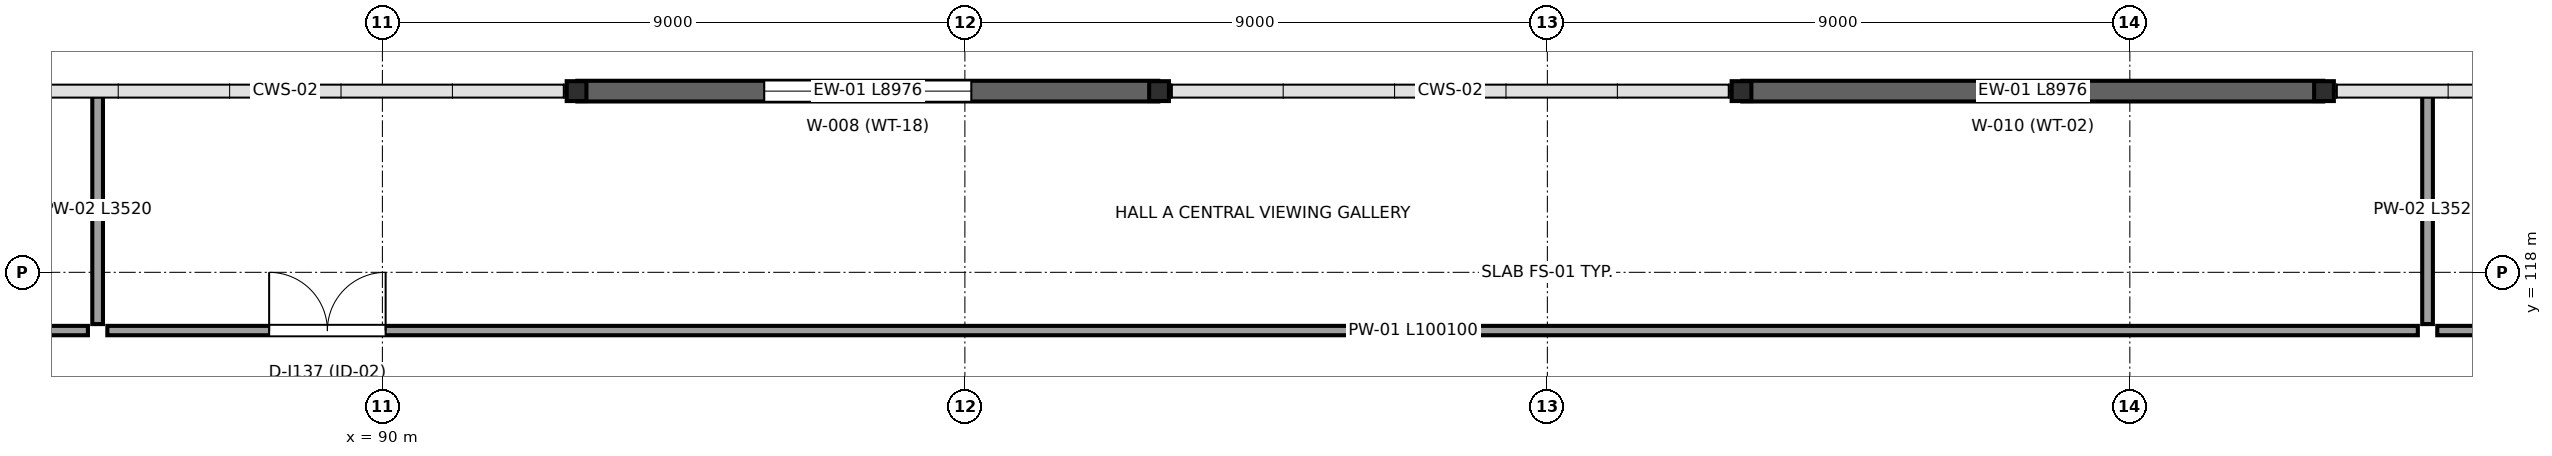
"""IFC4 building model, lengths in metres.
Left out: names, types, materials, properties, quantities, classifications, styles, units other than length and angle.
Written with IfcOpenShell. Run it as: python <this file> out.ifc"""

import sys

from ifc_helpers import new_model, si_unit, direction, frame, frame_2d, origin, origin_2d, place, context, subcontext, project, spatial, rectangle, i_section, extrude, element, fill, save


model = new_model("IFC4")
c1 = context("Model", 3, precision=1e-05, world=origin(), true_north=direction((0.0, 1.0)))
c2 = subcontext(c1, "Body", "Model", "MODEL_VIEW")
j1 = project(units=[si_unit("LENGTHUNIT", "METRE"), si_unit("PLANEANGLEUNIT", "RADIAN")], contexts=[c1])
p1 = place(None, origin())
s1 = spatial("IfcSite", under=j1, at=p1, CompositionType="ELEMENT")
p2 = place(p1, origin())
s2 = spatial("IfcBuilding", under=s1, at=p2, CompositionType="ELEMENT")
p3 = place(p2, frame((0.0, 0.0, 6.0)))
s3 = spatial("IfcBuildingStorey", under=s2, at=p3, CompositionType="ELEMENT", Elevation=6.0)
for number, where, z_axis, x_axis in (
    (1, (93.0, 120.8, 0.0), (0.0, 0.0, 1.0), (1.0, 0.0, 0.0)),
    (2, (102.0, 120.8, 0.0), (0.0, 0.0, 1.0), (1.0, 0.0, 0.0)),
    (3, (111.0, 120.8, 0.0), (0.0, 0.0, 1.0), (1.0, 0.0, 0.0)),
    (4, (120.0, 120.8, 0.0), (0.0, 0.0, 1.0), (1.0, 0.0, 0.0)),
):
    element("IfcColumn", number, at=place(p3, frame(where, z_axis=z_axis, x_axis=x_axis)), inside=s3, PredefinedType="COLUMN", context=c2, shape_type="SweptSolid", body=[
        extrude(i_section(OverallWidth=0.305, OverallDepth=0.307, WebThickness=0.01, FlangeThickness=0.015, at=origin_2d()), origin(), (0.0, 0.0, 1.0), 6.0),
    ])
p4 = place(p3, frame((93.012, 120.8, 0.0), z_axis=(0.0, 0.0, 1.0), x_axis=(1.0, 0.0, 0.0)))
e5 = element("IfcWall", 5, at=p4, inside=s3, PredefinedType="STANDARD", context=c2, shape_type="SweptSolid", body=[
    extrude(rectangle(XDim=8.976, YDim=0.32, at=frame_2d((4.488, 0.0))), origin(), (0.0, 0.0, 1.0), 5.78),
])
p5 = place(p4, frame((2.888, 0.0, 1.1)))
e6 = element("IfcOpeningElement", 6, at=p5, cuts=e5, PredefinedType="OPENING", context=c2, shape_type="SweptSolid", body=[
    extrude(rectangle(XDim=3.2, YDim=2.15, at=frame_2d((1.6, 1.075))), frame((0.0, 0.17, 0.0), z_axis=(0.0, -1.0, 0.0), x_axis=(1.0, 0.0, 0.0)), (0.0, 0.0, 1.0), 0.34),
])
p6 = place(p3, frame((111.012, 120.8, 0.0), z_axis=(0.0, 0.0, 1.0), x_axis=(1.0, 0.0, 0.0)))
e7 = element("IfcWall", 7, at=p6, inside=s3, PredefinedType="STANDARD", context=c2, shape_type="SweptSolid", body=[
    extrude(rectangle(XDim=8.976, YDim=0.32, at=frame_2d((4.488, 0.0))), origin(), (0.0, 0.0, 1.0), 5.78),
])
p7 = place(p6, frame((3.663, 0.0, 1.1)))
e8 = element("IfcOpeningElement", 8, at=p7, cuts=e7, PredefinedType="OPENING", context=c2, shape_type="SweptSolid", body=[
    extrude(rectangle(XDim=1.65, YDim=1.8, at=frame_2d((0.825, 0.9))), frame((0.0, 0.17, 0.0), z_axis=(0.0, -1.0, 0.0), x_axis=(1.0, 0.0, 0.0)), (0.0, 0.0, 1.0), 0.34),
])
p8 = place(p3, frame((68.15, 117.1, 0.0), z_axis=(0.0, 0.0, 1.0), x_axis=(1.0, 0.0, 0.0)))
e9 = element("IfcWall", 9, at=p8, inside=s3, PredefinedType="PARTITIONING", context=c2, shape_type="SweptSolid", body=[
    extrude(rectangle(XDim=17.3, YDim=0.145, at=frame_2d((8.65, 0.0))), origin(), (0.0, 0.0, 1.0), 4.55),
])
p9 = place(p8, frame((2.5, 0.0, 0.0)))
e10 = element("IfcOpeningElement", 10, at=p9, cuts=e9, PredefinedType="OPENING", context=c2, shape_type="SweptSolid", body=[
    extrude(rectangle(XDim=1.8, YDim=2.3, at=frame_2d((0.9, 1.15))), frame((0.0, 0.083, 0.0), z_axis=(0.0, -1.0, 0.0), x_axis=(1.0, 0.0, 0.0)), (0.0, 0.0, 1.0), 0.165),
])
p10 = place(p3, frame((85.75, 117.1, 0.0), z_axis=(0.0, 0.0, 1.0), x_axis=(1.0, 0.0, 0.0)))
e11 = element("IfcWall", 11, at=p10, inside=s3, PredefinedType="PARTITIONING", context=c2, shape_type="SweptSolid", body=[
    extrude(rectangle(XDim=35.7, YDim=0.145, at=frame_2d((17.85, 0.0))), origin(), (0.0, 0.0, 1.0), 4.55),
])
p11 = place(p10, frame((2.5, 0.0, 0.0)))
e12 = element("IfcOpeningElement", 12, at=p11, cuts=e11, PredefinedType="OPENING", context=c2, shape_type="SweptSolid", body=[
    extrude(rectangle(XDim=1.8, YDim=2.3, at=frame_2d((0.9, 1.15))), frame((0.0, 0.083, 0.0), z_axis=(0.0, -1.0, 0.0), x_axis=(1.0, 0.0, 0.0)), (0.0, 0.0, 1.0), 0.165),
])
p12 = place(p3, frame((121.75, 117.1, 0.0), z_axis=(0.0, 0.0, 1.0), x_axis=(1.0, 0.0, 0.0)))
e13 = element("IfcWall", 13, at=p12, inside=s3, PredefinedType="PARTITIONING", context=c2, shape_type="SweptSolid", body=[
    extrude(rectangle(XDim=29.6, YDim=0.145, at=frame_2d((14.8, 0.0))), origin(), (0.0, 0.0, 1.0), 4.55),
])
p13 = place(p12, frame((2.5, 0.0, 0.0)))
e14 = element("IfcOpeningElement", 14, at=p13, cuts=e13, PredefinedType="OPENING", context=c2, shape_type="SweptSolid", body=[
    extrude(rectangle(XDim=0.98, YDim=2.15, at=frame_2d((0.49, 1.075))), frame((0.0, 0.083, 0.0), z_axis=(0.0, -1.0, 0.0), x_axis=(1.0, 0.0, 0.0)), (0.0, 0.0, 1.0), 0.165),
])
p14 = place(p12, frame((6.5, 0.0, 0.0)))
e15 = element("IfcOpeningElement", 15, at=p14, cuts=e13, PredefinedType="OPENING", context=c2, shape_type="SweptSolid", body=[
    extrude(rectangle(XDim=1.05, YDim=2.18, at=frame_2d((0.525, 1.09))), frame((0.0, 0.083, 0.0), z_axis=(0.0, -1.0, 0.0), x_axis=(1.0, 0.0, 0.0)), (0.0, 0.0, 1.0), 0.165),
])
for number, where, z_axis, x_axis in (
    (16, (85.6, 117.2, 0.0), (0.0, 0.0, 1.0), (0.0, 1.0, 0.0)),
    (17, (121.6, 117.2, 0.0), (0.0, 0.0, 1.0), (0.0, 1.0, 0.0)),
):
    element("IfcWall", number, at=place(p3, frame(where, z_axis=z_axis, x_axis=x_axis)), inside=s3, PredefinedType="PARTITIONING", context=c2, shape_type="SweptSolid", body=[
        extrude(rectangle(XDim=3.52, YDim=0.165, at=frame_2d((1.76, 0.0))), origin(), (0.0, 0.0, 1.0), 4.55),
    ])
p15 = place(p5, origin())
e18 = element("IfcWindow", 18, at=p15, inside=s3, PartitioningType="SINGLE_PANEL", PredefinedType="WINDOW", context=c2, shape_type="SweptSolid", body=[
    extrude(rectangle(XDim=3.2, YDim=2.15, at=frame_2d((1.6, 1.075))), frame((0.0, 0.03, 0.0), z_axis=(0.0, -1.0, 0.0), x_axis=(1.0, 0.0, 0.0)), (0.0, 0.0, 1.0), 0.06),
])
fill(e6, e18)
p16 = place(p7, origin())
e19 = element("IfcWindow", 19, at=p16, inside=s3, PartitioningType="SINGLE_PANEL", PredefinedType="WINDOW", context=c2, shape_type="SweptSolid", body=[
    extrude(rectangle(XDim=1.65, YDim=1.8, at=frame_2d((0.825, 0.9))), frame((0.0, 0.03, 0.0), z_axis=(0.0, -1.0, 0.0), x_axis=(1.0, 0.0, 0.0)), (0.0, 0.0, 1.0), 0.06),
])
fill(e8, e19)
p17 = place(p11, origin())
e20 = element("IfcDoor", 20, at=p17, inside=s3, OperationType="DOUBLE_DOOR_SINGLE_SWING", PredefinedType="DOOR", context=c2, shape_type="SweptSolid", body=[
    extrude(rectangle(XDim=1.8, YDim=2.3, at=frame_2d((0.9, 1.15))), frame((0.0, 0.025, 0.0), z_axis=(0.0, -1.0, 0.0), x_axis=(1.0, 0.0, 0.0)), (0.0, 0.0, 1.0), 0.05),
])
fill(e12, e20)
save(model, sys.argv[1])
